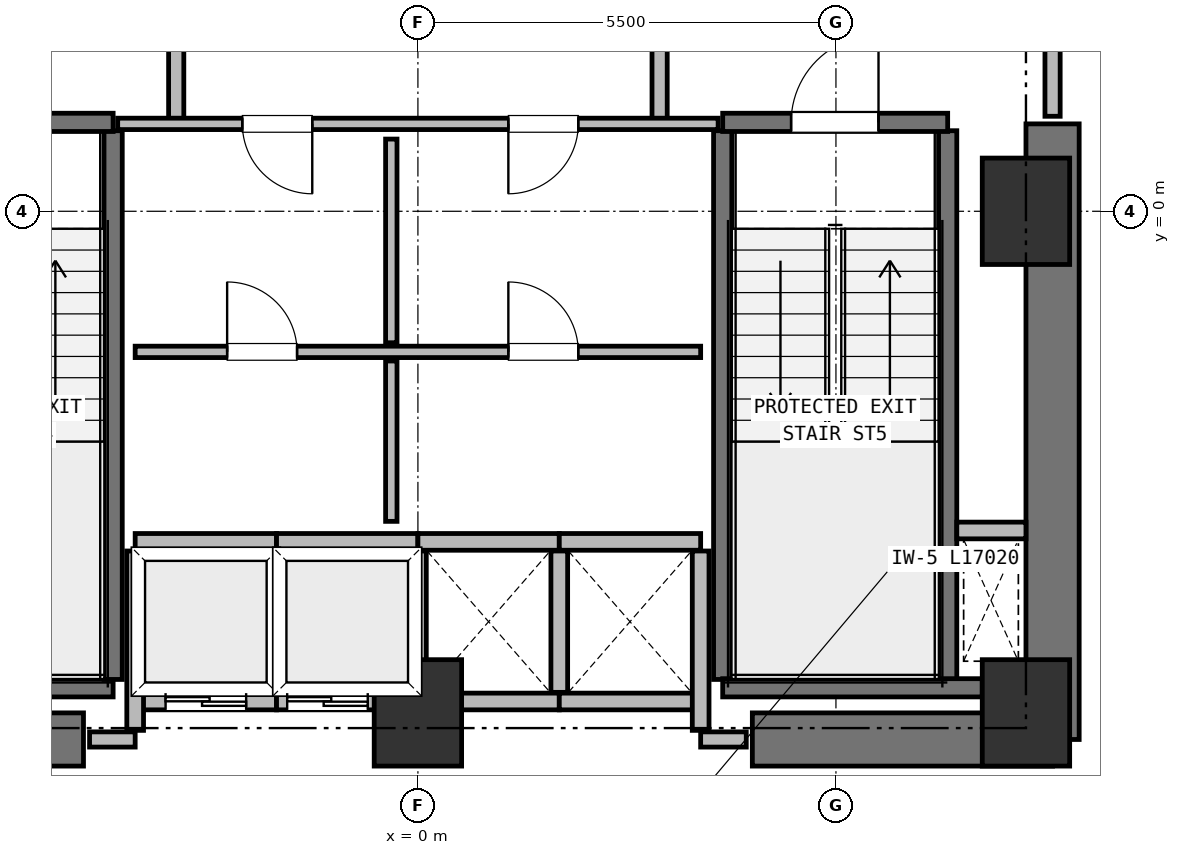
"""IFC4 building model, lengths in metres.
Left out: names, types, materials, properties, quantities, classifications, styles, units other than length and angle.
Written with IfcOpenShell. Run it as: python <this file> out.ifc"""

import sys

from ifc_helpers import new_model, si_unit, direction, frame, frame_2d, origin, origin_2d, place, context, subcontext, project, spatial, rectangle, extrude, element, fill, save


model = new_model("IFC4")
c1 = context("Model", 3, precision=1e-05, world=origin(), true_north=direction((0.0, 1.0)))
c2 = subcontext(c1, "Body", "Model", "MODEL_VIEW")
j1 = project(units=[si_unit("LENGTHUNIT", "METRE"), si_unit("PLANEANGLEUNIT", "RADIAN")], contexts=[c1])
p1 = place(None, origin())
s1 = spatial("IfcSite", under=j1, at=p1, CompositionType="ELEMENT")
p2 = place(p1, origin())
s2 = spatial("IfcBuilding", under=s1, at=p2, CompositionType="ELEMENT")
p3 = place(p2, frame((0.0, 0.0, 53.0)))
s3 = spatial("IfcBuildingStorey", under=s2, at=p3, CompositionType="ELEMENT", Elevation=53.0)
for number, where, z_axis, x_axis in (
    (1, (0.0, -6.6, 0.0), (0.0, 0.0, 1.0), (1.0, 0.0, 0.0)),
    (2, (8.0, -6.6, 0.0), (0.0, 0.0, 1.0), (1.0, 0.0, 0.0)),
    (3, (8.0, 0.0, 0.0), (0.0, 0.0, 1.0), (1.0, 0.0, 0.0)),
):
    element("IfcColumn", number, at=place(p3, frame(where, z_axis=z_axis, x_axis=x_axis)), inside=s3, PredefinedType="COLUMN", context=c2, shape_type="SweptSolid", body=[
        extrude(rectangle(XDim=1.15, YDim=1.4, at=origin_2d()), origin(), (0.0, 0.0, 1.0), 3.75),
    ])
for number, where, z_axis, x_axis in (
    (4, (-8.35, -6.95, 0.0), (0.0, 0.0, 1.0), (1.0, 0.0, 0.0)),
    (5, (4.4, -6.95, 0.0), (0.0, 0.0, 1.0), (1.0, 0.0, 0.0)),
):
    element("IfcWall", number, at=place(p3, frame(where, z_axis=z_axis, x_axis=x_axis)), inside=s3, PredefinedType="SHEAR", context=c2, shape_type="SweptSolid", body=[
        extrude(rectangle(XDim=3.95, YDim=0.7, at=frame_2d((1.975, 0.0))), origin(), (0.0, 0.0, 1.0), 3.5),
    ])
p4 = place(p3, frame((8.35, -6.95, 0.0), z_axis=(0.0, 0.0, 1.0), x_axis=(0.0, 1.0, 0.0)))
e6 = element("IfcWall", 6, at=p4, inside=s3, PredefinedType="SHEAR", context=c2, shape_type="SweptSolid", body=[
    extrude(rectangle(XDim=8.1, YDim=0.7, at=frame_2d((4.05, 0.0))), origin(), (0.0, 0.0, 1.0), 3.5),
])
p5 = place(p3, frame((-7.425, -6.27, 0.0), z_axis=(0.0, 0.0, 1.0), x_axis=(1.0, 0.0, 0.0)))
e7 = element("IfcWall", 7, at=p5, inside=s3, PredefinedType="SHEAR", context=c2, shape_type="SweptSolid", body=[
    extrude(rectangle(XDim=3.415, YDim=0.24, at=frame_2d((1.708, 0.0))), origin(), (0.0, 0.0, 1.0), 3.5),
])
p6 = place(p3, frame((-4.01, -6.16, 0.0), z_axis=(0.0, 0.0, 1.0), x_axis=(0.0, 1.0, 0.0)))
e8 = element("IfcWall", 8, at=p6, inside=s3, PredefinedType="SHEAR", context=c2, shape_type="SweptSolid", body=[
    extrude(rectangle(XDim=7.22, YDim=0.24, at=frame_2d((3.61, 0.0))), origin(), (0.0, 0.0, 1.0), 3.5),
])
p7 = place(p3, frame((-6.97, 1.17, 0.0), z_axis=(0.0, 0.0, 1.0), x_axis=(1.0, 0.0, 0.0)))
e9 = element("IfcWall", 9, at=p7, inside=s3, PredefinedType="SHEAR", context=c2, shape_type="SweptSolid", body=[
    extrude(rectangle(XDim=2.96, YDim=0.24, at=frame_2d((1.48, 0.0))), origin(), (0.0, 0.0, 1.0), 3.5),
])
p8 = place(p7, frame((0.9, 0.0, 0.0)))
e10 = element("IfcOpeningElement", 10, at=p8, cuts=e9, PredefinedType="OPENING", context=c2, shape_type="SweptSolid", body=[
    extrude(rectangle(XDim=1.15, YDim=2.15, at=frame_2d((0.575, 1.075))), frame((0.0, 0.13, 0.0), z_axis=(0.0, -1.0, 0.0), x_axis=(1.0, 0.0, 0.0)), (0.0, 0.0, 1.0), 0.26),
])
for number, where, z_axis, x_axis in (
    (11, (4.01, -6.16, 0.0), (0.0, 0.0, 1.0), (0.0, 1.0, 0.0)),
    (12, (6.97, -6.16, 0.0), (0.0, 0.0, 1.0), (0.0, 1.0, 0.0)),
):
    element("IfcWall", number, at=place(p3, frame(where, z_axis=z_axis, x_axis=x_axis)), inside=s3, PredefinedType="SHEAR", context=c2, shape_type="SweptSolid", body=[
        extrude(rectangle(XDim=7.22, YDim=0.24, at=frame_2d((3.61, 0.0))), origin(), (0.0, 0.0, 1.0), 3.5),
    ])
p9 = place(p3, frame((4.01, -6.27, 0.0), z_axis=(0.0, 0.0, 1.0), x_axis=(1.0, 0.0, 0.0)))
e13 = element("IfcWall", 13, at=p9, inside=s3, PredefinedType="SHEAR", context=c2, shape_type="SweptSolid", body=[
    extrude(rectangle(XDim=3.415, YDim=0.24, at=frame_2d((1.708, 0.0))), origin(), (0.0, 0.0, 1.0), 3.5),
])
p10 = place(p3, frame((4.01, 1.17, 0.0), z_axis=(0.0, 0.0, 1.0), x_axis=(1.0, 0.0, 0.0)))
e14 = element("IfcWall", 14, at=p10, inside=s3, PredefinedType="SHEAR", context=c2, shape_type="SweptSolid", body=[
    extrude(rectangle(XDim=2.96, YDim=0.24, at=frame_2d((1.48, 0.0))), origin(), (0.0, 0.0, 1.0), 3.5),
])
p11 = place(p10, frame((0.9, 0.0, 0.0)))
e15 = element("IfcOpeningElement", 15, at=p11, cuts=e14, PredefinedType="OPENING", context=c2, shape_type="SweptSolid", body=[
    extrude(rectangle(XDim=1.15, YDim=2.15, at=frame_2d((0.575, 1.075))), frame((0.0, 0.13, 0.0), z_axis=(0.0, -1.0, 0.0), x_axis=(1.0, 0.0, 0.0)), (0.0, 0.0, 1.0), 0.26),
])
p12 = place(p3, frame((7.09, -4.2, 0.0), z_axis=(0.0, 0.0, 1.0), x_axis=(1.0, 0.0, 0.0)))
e16 = element("IfcWall", 16, at=p12, inside=s3, PredefinedType="PARTITIONING", context=c2, shape_type="SweptSolid", body=[
    extrude(rectangle(XDim=0.91, YDim=0.22, at=frame_2d((0.455, 0.0))), origin(), (0.0, 0.0, 1.0), 3.5),
])
p13 = place(p3, frame((-3.72, -6.45, 0.0), z_axis=(0.0, 0.0, 1.0), x_axis=(1.0, 0.0, 0.0)))
e17 = element("IfcWall", 17, at=p13, inside=s3, PredefinedType="PARTITIONING", context=c2, shape_type="SweptSolid", body=[
    extrude(rectangle(XDim=1.86, YDim=0.22, at=frame_2d((0.93, 0.0))), origin(), (0.0, 0.0, 1.0), 3.08),
])
p14 = place(p13, frame((0.4, 0.0, 0.0)))
e18 = element("IfcOpeningElement", 18, at=p14, cuts=e17, PredefinedType="OPENING", context=c2, shape_type="SweptSolid", body=[
    extrude(rectangle(XDim=1.06, YDim=2.15, at=frame_2d((0.53, 1.075))), frame((0.0, 0.12, 0.0), z_axis=(0.0, -1.0, 0.0), x_axis=(1.0, 0.0, 0.0)), (0.0, 0.0, 1.0), 0.24),
])
p15 = place(p3, frame((-3.72, -4.35, 0.0), z_axis=(0.0, 0.0, 1.0), x_axis=(1.0, 0.0, 0.0)))
e19 = element("IfcWall", 19, at=p15, inside=s3, PredefinedType="PARTITIONING", context=c2, shape_type="SweptSolid", body=[
    extrude(rectangle(XDim=1.86, YDim=0.22, at=frame_2d((0.93, 0.0))), origin(), (0.0, 0.0, 1.0), 3.5),
])
p16 = place(p3, frame((-3.72, -6.83, 0.0), z_axis=(0.0, 0.0, 1.0), x_axis=(0.0, 1.0, 0.0)))
e20 = element("IfcWall", 20, at=p16, inside=s3, PredefinedType="PARTITIONING", context=c2, shape_type="SweptSolid", body=[
    extrude(rectangle(XDim=2.36, YDim=0.22, at=frame_2d((1.18, 0.0))), origin(), (0.0, 0.0, 1.0), 3.5),
])
p17 = place(p3, frame((-1.86, -6.33, 0.0), z_axis=(0.0, 0.0, 1.0), x_axis=(0.0, 1.0, 0.0)))
e21 = element("IfcWall", 21, at=p17, inside=s3, PredefinedType="PARTITIONING", context=c2, shape_type="SweptSolid", body=[
    extrude(rectangle(XDim=1.86, YDim=0.22, at=frame_2d((0.93, 0.0))), origin(), (0.0, 0.0, 1.0), 3.5),
])
p18 = place(p3, frame((-1.86, -6.45, 0.0), z_axis=(0.0, 0.0, 1.0), x_axis=(1.0, 0.0, 0.0)))
e22 = element("IfcWall", 22, at=p18, inside=s3, PredefinedType="PARTITIONING", context=c2, shape_type="SweptSolid", body=[
    extrude(rectangle(XDim=1.86, YDim=0.22, at=frame_2d((0.93, 0.0))), origin(), (0.0, 0.0, 1.0), 3.08),
])
p19 = place(p18, frame((0.14, 0.0, 0.0)))
e23 = element("IfcOpeningElement", 23, at=p19, cuts=e22, PredefinedType="OPENING", context=c2, shape_type="SweptSolid", body=[
    extrude(rectangle(XDim=1.06, YDim=2.15, at=frame_2d((0.53, 1.075))), frame((0.0, 0.12, 0.0), z_axis=(0.0, -1.0, 0.0), x_axis=(1.0, 0.0, 0.0)), (0.0, 0.0, 1.0), 0.24),
])
for number, where, z_axis, x_axis in (
    (24, (-1.86, -4.35, 0.0), (0.0, 0.0, 1.0), (1.0, 0.0, 0.0)),
    (25, (0.0, -6.33, 0.0), (0.0, 0.0, 1.0), (0.0, 1.0, 0.0)),
):
    element("IfcWall", number, at=place(p3, frame(where, z_axis=z_axis, x_axis=x_axis)), inside=s3, PredefinedType="PARTITIONING", context=c2, shape_type="SweptSolid", body=[
        extrude(rectangle(XDim=1.86, YDim=0.22, at=frame_2d((0.93, 0.0))), origin(), (0.0, 0.0, 1.0), 3.5),
    ])
p20 = place(p3, frame((0.0, -6.45, 0.0), z_axis=(0.0, 0.0, 1.0), x_axis=(1.0, 0.0, 0.0)))
e26 = element("IfcWall", 26, at=p20, inside=s3, PredefinedType="PARTITIONING", context=c2, shape_type="SweptSolid", body=[
    extrude(rectangle(XDim=1.86, YDim=0.22, at=frame_2d((0.93, 0.0))), origin(), (0.0, 0.0, 1.0), 3.08),
])
for number, where, z_axis, x_axis in (
    (27, (0.0, -4.35, 0.0), (0.0, 0.0, 1.0), (1.0, 0.0, 0.0)),
    (28, (1.86, -6.33, 0.0), (0.0, 0.0, 1.0), (0.0, 1.0, 0.0)),
):
    element("IfcWall", number, at=place(p3, frame(where, z_axis=z_axis, x_axis=x_axis)), inside=s3, PredefinedType="PARTITIONING", context=c2, shape_type="SweptSolid", body=[
        extrude(rectangle(XDim=1.86, YDim=0.22, at=frame_2d((0.93, 0.0))), origin(), (0.0, 0.0, 1.0), 3.5),
    ])
p21 = place(p3, frame((1.86, -6.45, 0.0), z_axis=(0.0, 0.0, 1.0), x_axis=(1.0, 0.0, 0.0)))
e29 = element("IfcWall", 29, at=p21, inside=s3, PredefinedType="PARTITIONING", context=c2, shape_type="SweptSolid", body=[
    extrude(rectangle(XDim=1.86, YDim=0.22, at=frame_2d((0.93, 0.0))), origin(), (0.0, 0.0, 1.0), 3.08),
])
p22 = place(p3, frame((1.86, -4.35, 0.0), z_axis=(0.0, 0.0, 1.0), x_axis=(1.0, 0.0, 0.0)))
e30 = element("IfcWall", 30, at=p22, inside=s3, PredefinedType="PARTITIONING", context=c2, shape_type="SweptSolid", body=[
    extrude(rectangle(XDim=1.86, YDim=0.22, at=frame_2d((0.93, 0.0))), origin(), (0.0, 0.0, 1.0), 3.5),
])
p23 = place(p3, frame((3.72, -6.83, 0.0), z_axis=(0.0, 0.0, 1.0), x_axis=(0.0, 1.0, 0.0)))
e31 = element("IfcWall", 31, at=p23, inside=s3, PredefinedType="PARTITIONING", context=c2, shape_type="SweptSolid", body=[
    extrude(rectangle(XDim=2.36, YDim=0.22, at=frame_2d((1.18, 0.0))), origin(), (0.0, 0.0, 1.0), 3.5),
])
p24 = place(p3, frame((-3.18, 1.15, 0.0), z_axis=(0.0, 0.0, 1.0), x_axis=(0.0, 1.0, 0.0)))
e32 = element("IfcWall", 32, at=p24, inside=s3, PredefinedType="PARTITIONING", context=c2, shape_type="SweptSolid", body=[
    extrude(rectangle(XDim=3.3, YDim=0.2, at=frame_2d((1.65, 0.0))), origin(), (0.0, 0.0, 1.0), 3.5),
])
p25 = place(p24, frame((1.08, 0.0, 0.0)))
e33 = element("IfcOpeningElement", 33, at=p25, cuts=e32, PredefinedType="OPENING", context=c2, shape_type="SweptSolid", body=[
    extrude(rectangle(XDim=1.15, YDim=2.15, at=frame_2d((0.575, 1.075))), frame((0.0, 0.11, 0.0), z_axis=(0.0, -1.0, 0.0), x_axis=(1.0, 0.0, 0.0)), (0.0, 0.0, 1.0), 0.22),
])
p26 = place(p3, frame((3.18, 1.15, 0.0), z_axis=(0.0, 0.0, 1.0), x_axis=(0.0, 1.0, 0.0)))
e34 = element("IfcWall", 34, at=p26, inside=s3, PredefinedType="PARTITIONING", context=c2, shape_type="SweptSolid", body=[
    extrude(rectangle(XDim=3.3, YDim=0.2, at=frame_2d((1.65, 0.0))), origin(), (0.0, 0.0, 1.0), 3.5),
])
p27 = place(p26, frame((1.08, 0.0, 0.0)))
e35 = element("IfcOpeningElement", 35, at=p27, cuts=e34, PredefinedType="OPENING", context=c2, shape_type="SweptSolid", body=[
    extrude(rectangle(XDim=1.15, YDim=2.15, at=frame_2d((0.575, 1.075))), frame((0.0, 0.11, 0.0), z_axis=(0.0, -1.0, 0.0), x_axis=(1.0, 0.0, 0.0)), (0.0, 0.0, 1.0), 0.22),
])
p28 = place(p3, frame((8.35, 1.25, 0.0), z_axis=(0.0, 0.0, 1.0), x_axis=(0.0, 1.0, 0.0)))
e36 = element("IfcWall", 36, at=p28, inside=s3, PredefinedType="PARTITIONING", context=c2, shape_type="SweptSolid", body=[
    extrude(rectangle(XDim=5.3, YDim=0.2, at=frame_2d((2.65, 0.0))), origin(), (0.0, 0.0, 1.0), 3.5),
])
p29 = place(p28, frame((0.95, 0.0, 0.0)))
e37 = element("IfcOpeningElement", 37, at=p29, cuts=e36, PredefinedType="OPENING", context=c2, shape_type="SweptSolid", body=[
    extrude(rectangle(XDim=1.15, YDim=2.15, at=frame_2d((0.575, 1.075))), frame((0.0, 0.11, 0.0), z_axis=(0.0, -1.0, 0.0), x_axis=(1.0, 0.0, 0.0)), (0.0, 0.0, 1.0), 0.22),
])
p30 = place(p3, frame((3.95, 1.15, 0.0), z_axis=(0.0, 0.0, 1.0), x_axis=(-1.0, 0.0, 0.0)))
e38 = element("IfcWall", 38, at=p30, inside=s3, PredefinedType="PARTITIONING", context=c2, shape_type="SweptSolid", body=[
    extrude(rectangle(XDim=7.9, YDim=0.15, at=frame_2d((3.95, 0.0))), origin(), (0.0, 0.0, 1.0), 3.5),
])
p31 = place(p30, frame((5.34, 0.0, 0.0)))
e39 = element("IfcOpeningElement", 39, at=p31, cuts=e38, PredefinedType="OPENING", context=c2, shape_type="SweptSolid", body=[
    extrude(rectangle(XDim=0.92, YDim=2.05, at=frame_2d((0.46, 1.025))), frame((0.0, 0.085, 0.0), z_axis=(0.0, -1.0, 0.0), x_axis=(1.0, 0.0, 0.0)), (0.0, 0.0, 1.0), 0.17),
])
p32 = place(p30, frame((1.84, 0.0, 0.0)))
e40 = element("IfcOpeningElement", 40, at=p32, cuts=e38, PredefinedType="OPENING", context=c2, shape_type="SweptSolid", body=[
    extrude(rectangle(XDim=0.92, YDim=2.05, at=frame_2d((0.46, 1.025))), frame((0.0, 0.085, 0.0), z_axis=(0.0, -1.0, 0.0), x_axis=(1.0, 0.0, 0.0)), (0.0, 0.0, 1.0), 0.17),
])
for number, where, z_axis, x_axis in (
    (41, (-4.32, -6.95, 0.0), (0.0, 0.0, 1.0), (1.0, 0.0, 0.0)),
    (42, (3.72, -6.95, 0.0), (0.0, 0.0, 1.0), (1.0, 0.0, 0.0)),
):
    element("IfcWall", number, at=place(p3, frame(where, z_axis=z_axis, x_axis=x_axis)), inside=s3, PredefinedType="PARTITIONING", context=c2, shape_type="SweptSolid", body=[
        extrude(rectangle(XDim=0.6, YDim=0.2, at=frame_2d((0.3, 0.0))), origin(), (0.0, 0.0, 1.0), 3.5),
    ])
p33 = place(p3, frame((-3.72, -1.85, 0.0), z_axis=(0.0, 0.0, 1.0), x_axis=(1.0, 0.0, 0.0)))
e43 = element("IfcWall", 43, at=p33, inside=s3, PredefinedType="PARTITIONING", context=c2, shape_type="SweptSolid", body=[
    extrude(rectangle(XDim=7.44, YDim=0.15, at=frame_2d((3.72, 0.0))), origin(), (0.0, 0.0, 1.0), 3.5),
])
p34 = place(p33, frame((1.21, 0.0, 0.0)))
e44 = element("IfcOpeningElement", 44, at=p34, cuts=e43, PredefinedType="OPENING", context=c2, shape_type="SweptSolid", body=[
    extrude(rectangle(XDim=0.92, YDim=2.05, at=frame_2d((0.46, 1.025))), frame((0.0, 0.085, 0.0), z_axis=(0.0, -1.0, 0.0), x_axis=(1.0, 0.0, 0.0)), (0.0, 0.0, 1.0), 0.17),
])
p35 = place(p33, frame((4.91, 0.0, 0.0)))
e45 = element("IfcOpeningElement", 45, at=p35, cuts=e43, PredefinedType="OPENING", context=c2, shape_type="SweptSolid", body=[
    extrude(rectangle(XDim=0.92, YDim=2.05, at=frame_2d((0.46, 1.025))), frame((0.0, 0.085, 0.0), z_axis=(0.0, -1.0, 0.0), x_axis=(1.0, 0.0, 0.0)), (0.0, 0.0, 1.0), 0.17),
])
p36 = place(p3, frame((-0.35, -4.08, 0.0), z_axis=(0.0, 0.0, 1.0), x_axis=(0.0, 1.0, 0.0)))
e46 = element("IfcWall", 46, at=p36, inside=s3, PredefinedType="PARTITIONING", context=c2, shape_type="SweptSolid", body=[
    extrude(rectangle(XDim=2.11, YDim=0.15, at=frame_2d((1.055, 0.0))), origin(), (0.0, 0.0, 1.0), 3.5),
])
p37 = place(p3, frame((-0.35, -1.73, 0.0), z_axis=(0.0, 0.0, 1.0), x_axis=(0.0, 1.0, 0.0)))
e47 = element("IfcWall", 47, at=p37, inside=s3, PredefinedType="PARTITIONING", context=c2, shape_type="SweptSolid", body=[
    extrude(rectangle(XDim=2.68, YDim=0.15, at=frame_2d((1.34, 0.0))), origin(), (0.0, 0.0, 1.0), 3.5),
])
p38 = place(p3, frame((10.752, -7.178, 0.0), z_axis=(0.0, 0.0, 1.0), x_axis=(-0.707067066127, -0.707146494016, 0.0)))
e48 = element("IfcWall", 48, at=p38, inside=s3, PredefinedType="PARTITIONING", context=c2, shape_type="SweptSolid", body=[
    extrude(rectangle(XDim=3.074, YDim=0.15, at=frame_2d((1.537, 0.0))), origin(), (0.0, 0.0, 1.0), 3.12),
])
p39 = place(p11, origin())
e49 = element("IfcDoor", 49, at=p39, inside=s3, OperationType="SINGLE_SWING_RIGHT", PredefinedType="DOOR", context=c2, shape_type="SweptSolid", body=[
    extrude(rectangle(XDim=1.15, YDim=2.15, at=frame_2d((0.575, 1.075))), frame((0.0, 0.025, 0.0), z_axis=(0.0, -1.0, 0.0), x_axis=(1.0, 0.0, 0.0)), (0.0, 0.0, 1.0), 0.05),
])
fill(e15, e49)
p40 = place(p14, origin())
e50 = element("IfcDoor", 50, at=p40, inside=s3, OperationType="DOUBLE_DOOR_SLIDING", PredefinedType="DOOR", context=c2, shape_type="SweptSolid", body=[
    extrude(rectangle(XDim=1.06, YDim=2.15, at=frame_2d((0.53, 1.075))), frame((0.0, 0.025, 0.0), z_axis=(0.0, -1.0, 0.0), x_axis=(1.0, 0.0, 0.0)), (0.0, 0.0, 1.0), 0.05),
])
fill(e18, e50)
p41 = place(p19, origin())
e51 = element("IfcDoor", 51, at=p41, inside=s3, OperationType="DOUBLE_DOOR_SLIDING", PredefinedType="DOOR", context=c2, shape_type="SweptSolid", body=[
    extrude(rectangle(XDim=1.06, YDim=2.15, at=frame_2d((0.53, 1.075))), frame((0.0, 0.025, 0.0), z_axis=(0.0, -1.0, 0.0), x_axis=(1.0, 0.0, 0.0)), (0.0, 0.0, 1.0), 0.05),
])
fill(e23, e51)
p42 = place(p31, origin())
e52 = element("IfcDoor", 52, at=p42, inside=s3, OperationType="SINGLE_SWING_LEFT", PredefinedType="DOOR", context=c2, shape_type="SweptSolid", body=[
    extrude(rectangle(XDim=0.92, YDim=2.05, at=frame_2d((0.46, 1.025))), frame((0.0, 0.025, 0.0), z_axis=(0.0, -1.0, 0.0), x_axis=(1.0, 0.0, 0.0)), (0.0, 0.0, 1.0), 0.05),
])
fill(e39, e52)
p43 = place(p32, origin())
e53 = element("IfcDoor", 53, at=p43, inside=s3, OperationType="SINGLE_SWING_RIGHT", PredefinedType="DOOR", context=c2, shape_type="SweptSolid", body=[
    extrude(rectangle(XDim=0.92, YDim=2.05, at=frame_2d((0.46, 1.025))), frame((0.0, 0.025, 0.0), z_axis=(0.0, -1.0, 0.0), x_axis=(1.0, 0.0, 0.0)), (0.0, 0.0, 1.0), 0.05),
])
fill(e40, e53)
p44 = place(p34, origin())
e54 = element("IfcDoor", 54, at=p44, inside=s3, OperationType="SINGLE_SWING_LEFT", PredefinedType="DOOR", context=c2, shape_type="SweptSolid", body=[
    extrude(rectangle(XDim=0.92, YDim=2.05, at=frame_2d((0.46, 1.025))), frame((0.0, 0.025, 0.0), z_axis=(0.0, -1.0, 0.0), x_axis=(1.0, 0.0, 0.0)), (0.0, 0.0, 1.0), 0.05),
])
fill(e44, e54)
p45 = place(p35, origin())
e55 = element("IfcDoor", 55, at=p45, inside=s3, OperationType="SINGLE_SWING_LEFT", PredefinedType="DOOR", context=c2, shape_type="SweptSolid", body=[
    extrude(rectangle(XDim=0.92, YDim=2.05, at=frame_2d((0.46, 1.025))), frame((0.0, 0.025, 0.0), z_axis=(0.0, -1.0, 0.0), x_axis=(1.0, 0.0, 0.0)), (0.0, 0.0, 1.0), 0.05),
])
fill(e45, e55)
save(model, sys.argv[1])
